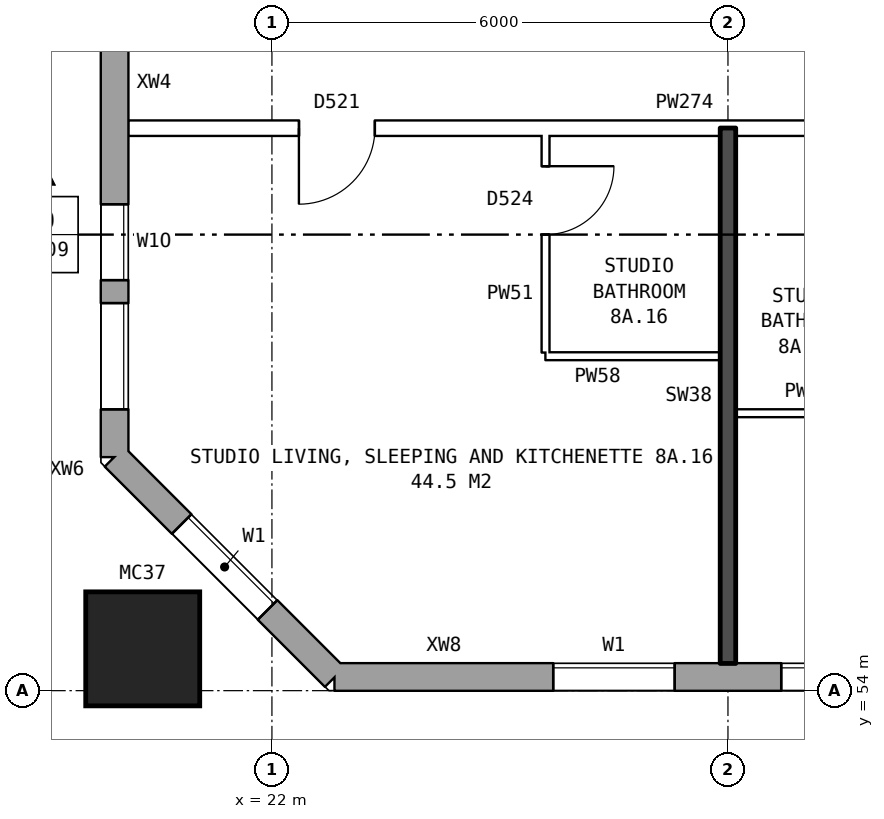
"""IFC4 building model, lengths in metres.
Left out: names, types, materials, properties, quantities, classifications, styles, units other than length and angle.
Written with IfcOpenShell. Run it as: python <this file> out.ifc"""

import sys

from ifc_helpers import new_model, si_unit, direction, frame, frame_2d, origin, origin_2d, place, context, subcontext, project, spatial, rectangle, hollow_rectangle, extrude, element, fill, save


model = new_model("IFC4")
c1 = context("Model", 3, precision=1e-05, world=origin(), true_north=direction((0.0, 1.0)))
c2 = subcontext(c1, "Body", "Model", "MODEL_VIEW")
j1 = project(units=[si_unit("LENGTHUNIT", "METRE"), si_unit("PLANEANGLEUNIT", "RADIAN")], contexts=[c1])
p1 = place(None, origin())
s1 = spatial("IfcSite", under=j1, at=p1, CompositionType="ELEMENT")
p2 = place(p1, origin())
s2 = spatial("IfcBuilding", under=s1, at=p2, CompositionType="ELEMENT")
p3 = place(p2, frame((0.0, 0.0, 31.9)))
s3 = spatial("IfcBuildingStorey", under=s2, at=p3, CompositionType="ELEMENT", Elevation=31.9)
p4 = place(p3, frame((20.3, 54.55, 0.0), z_axis=(0.0, 0.0, 1.0), x_axis=(1.0, 0.0, 0.0)))
e1 = element("IfcColumn", 1, at=p4, inside=s3, PredefinedType="COLUMN", context=c2, shape_type="SweptSolid", body=[
    extrude(hollow_rectangle(XDim=1.5, YDim=1.5, WallThickness=0.08, at=origin_2d()), origin(), (0.0, 0.0, 1.0), 3.1),
])
p5 = place(p3, frame((19.93, 57.075, 0.0), z_axis=(0.0, 0.0, 1.0), x_axis=(0.707106781187, -0.707106781187, 0.0)))
e2 = element("IfcWall", 2, at=p5, inside=s3, PredefinedType="STANDARD", context=c2, shape_type="SweptSolid", body=[
    extrude(rectangle(XDim=4.094, YDim=0.36, at=frame_2d((2.047, 0.0))), origin(), (0.0, 0.0, 1.0), 2.85),
])
p6 = place(p5, frame((1.247, 0.0, 0.8)))
e3 = element("IfcOpeningElement", 3, at=p6, cuts=e2, PredefinedType="OPENING", context=c2, shape_type="SweptSolid", body=[
    extrude(rectangle(XDim=1.6, YDim=1.8, at=frame_2d((0.8, 0.9))), frame((0.0, 0.19, 0.0), z_axis=(0.0, -1.0, 0.0), x_axis=(1.0, 0.0, 0.0)), (0.0, 0.0, 1.0), 0.38),
])
p7 = place(p3, frame((22.825, 54.18, 0.0), z_axis=(0.0, 0.0, 1.0), x_axis=(1.0, 0.0, 0.0)))
e4 = element("IfcWall", 4, at=p7, inside=s3, PredefinedType="STANDARD", context=c2, shape_type="SweptSolid", body=[
    extrude(rectangle(XDim=50.101, YDim=0.36, at=frame_2d((25.05, 0.0))), origin(), (0.0, 0.0, 1.0), 2.85),
])
p8 = place(p7, frame((2.875, 0.0, 0.8)))
e5 = element("IfcOpeningElement", 5, at=p8, cuts=e4, PredefinedType="OPENING", context=c2, shape_type="SweptSolid", body=[
    extrude(rectangle(XDim=1.6, YDim=1.8, at=frame_2d((0.8, 0.9))), frame((0.0, 0.19, 0.0), z_axis=(0.0, -1.0, 0.0), x_axis=(1.0, 0.0, 0.0)), (0.0, 0.0, 1.0), 0.38),
])
p9 = place(p7, frame((5.875, 0.0, 0.8)))
e6 = element("IfcOpeningElement", 6, at=p9, cuts=e4, PredefinedType="OPENING", context=c2, shape_type="SweptSolid", body=[
    extrude(rectangle(XDim=1.6, YDim=1.8, at=frame_2d((0.8, 0.9))), frame((0.0, 0.19, 0.0), z_axis=(0.0, -1.0, 0.0), x_axis=(1.0, 0.0, 0.0)), (0.0, 0.0, 1.0), 0.38),
])
p10 = place(p7, frame((8.875, 0.0, 0.8)))
e7 = element("IfcOpeningElement", 7, at=p10, cuts=e4, PredefinedType="OPENING", context=c2, shape_type="SweptSolid", body=[
    extrude(rectangle(XDim=1.6, YDim=1.8, at=frame_2d((0.8, 0.9))), frame((0.0, 0.19, 0.0), z_axis=(0.0, -1.0, 0.0), x_axis=(1.0, 0.0, 0.0)), (0.0, 0.0, 1.0), 0.38),
])
p11 = place(p7, frame((11.875, 0.0, 0.8)))
e8 = element("IfcOpeningElement", 8, at=p11, cuts=e4, PredefinedType="OPENING", context=c2, shape_type="SweptSolid", body=[
    extrude(rectangle(XDim=1.6, YDim=1.8, at=frame_2d((0.8, 0.9))), frame((0.0, 0.19, 0.0), z_axis=(0.0, -1.0, 0.0), x_axis=(1.0, 0.0, 0.0)), (0.0, 0.0, 1.0), 0.38),
])
p12 = place(p7, frame((14.875, 0.0, 0.8)))
e9 = element("IfcOpeningElement", 9, at=p12, cuts=e4, PredefinedType="OPENING", context=c2, shape_type="SweptSolid", body=[
    extrude(rectangle(XDim=1.6, YDim=1.8, at=frame_2d((0.8, 0.9))), frame((0.0, 0.19, 0.0), z_axis=(0.0, -1.0, 0.0), x_axis=(1.0, 0.0, 0.0)), (0.0, 0.0, 1.0), 0.38),
])
p13 = place(p7, frame((17.375, 0.0, 1.6)))
e10 = element("IfcOpeningElement", 10, at=p13, cuts=e4, PredefinedType="OPENING", context=c2, shape_type="SweptSolid", body=[
    extrude(rectangle(XDim=0.6, YDim=0.9, at=frame_2d((0.3, 0.45))), frame((0.0, 0.19, 0.0), z_axis=(0.0, -1.0, 0.0), x_axis=(1.0, 0.0, 0.0)), (0.0, 0.0, 1.0), 0.38),
])
p14 = place(p7, frame((20.875, 0.0, 0.8)))
e11 = element("IfcOpeningElement", 11, at=p14, cuts=e4, PredefinedType="OPENING", context=c2, shape_type="SweptSolid", body=[
    extrude(rectangle(XDim=1.6, YDim=1.8, at=frame_2d((0.8, 0.9))), frame((0.0, 0.19, 0.0), z_axis=(0.0, -1.0, 0.0), x_axis=(1.0, 0.0, 0.0)), (0.0, 0.0, 1.0), 0.38),
])
p15 = place(p7, frame((23.875, 0.0, 0.8)))
e12 = element("IfcOpeningElement", 12, at=p15, cuts=e4, PredefinedType="OPENING", context=c2, shape_type="SweptSolid", body=[
    extrude(rectangle(XDim=1.6, YDim=1.8, at=frame_2d((0.8, 0.9))), frame((0.0, 0.19, 0.0), z_axis=(0.0, -1.0, 0.0), x_axis=(1.0, 0.0, 0.0)), (0.0, 0.0, 1.0), 0.38),
])
p16 = place(p7, frame((26.875, 0.0, 0.8)))
e13 = element("IfcOpeningElement", 13, at=p16, cuts=e4, PredefinedType="OPENING", context=c2, shape_type="SweptSolid", body=[
    extrude(rectangle(XDim=1.6, YDim=1.8, at=frame_2d((0.8, 0.9))), frame((0.0, 0.19, 0.0), z_axis=(0.0, -1.0, 0.0), x_axis=(1.0, 0.0, 0.0)), (0.0, 0.0, 1.0), 0.38),
])
p17 = place(p7, frame((29.375, 0.0, 0.15)))
e14 = element("IfcOpeningElement", 14, at=p17, cuts=e4, PredefinedType="OPENING", context=c2, shape_type="SweptSolid", body=[
    extrude(rectangle(XDim=0.8, YDim=1.8, at=frame_2d((0.4, 0.9))), frame((0.0, 0.19, 0.0), z_axis=(0.0, -1.0, 0.0), x_axis=(1.0, 0.0, 0.0)), (0.0, 0.0, 1.0), 0.38),
])
p18 = place(p7, frame((32.425, 0.0, 1.4)))
e15 = element("IfcOpeningElement", 15, at=p18, cuts=e4, PredefinedType="OPENING", context=c2, shape_type="SweptSolid", body=[
    extrude(rectangle(XDim=0.6, YDim=1.2, at=frame_2d((0.3, 0.6))), frame((0.0, 0.19, 0.0), z_axis=(0.0, -1.0, 0.0), x_axis=(1.0, 0.0, 0.0)), (0.0, 0.0, 1.0), 0.38),
])
p19 = place(p7, frame((35.875, 0.0, 0.8)))
e16 = element("IfcOpeningElement", 16, at=p19, cuts=e4, PredefinedType="OPENING", context=c2, shape_type="SweptSolid", body=[
    extrude(rectangle(XDim=1.6, YDim=1.8, at=frame_2d((0.8, 0.9))), frame((0.0, 0.19, 0.0), z_axis=(0.0, -1.0, 0.0), x_axis=(1.0, 0.0, 0.0)), (0.0, 0.0, 1.0), 0.38),
])
p20 = place(p7, frame((38.875, 0.0, 0.8)))
e17 = element("IfcOpeningElement", 17, at=p20, cuts=e4, PredefinedType="OPENING", context=c2, shape_type="SweptSolid", body=[
    extrude(rectangle(XDim=1.6, YDim=1.8, at=frame_2d((0.8, 0.9))), frame((0.0, 0.19, 0.0), z_axis=(0.0, -1.0, 0.0), x_axis=(1.0, 0.0, 0.0)), (0.0, 0.0, 1.0), 0.38),
])
p21 = place(p7, frame((41.875, 0.0, 0.8)))
e18 = element("IfcOpeningElement", 18, at=p21, cuts=e4, PredefinedType="OPENING", context=c2, shape_type="SweptSolid", body=[
    extrude(rectangle(XDim=1.6, YDim=1.8, at=frame_2d((0.8, 0.9))), frame((0.0, 0.19, 0.0), z_axis=(0.0, -1.0, 0.0), x_axis=(1.0, 0.0, 0.0)), (0.0, 0.0, 1.0), 0.38),
])
p22 = place(p7, frame((44.875, 0.0, 0.8)))
e19 = element("IfcOpeningElement", 19, at=p22, cuts=e4, PredefinedType="OPENING", context=c2, shape_type="SweptSolid", body=[
    extrude(rectangle(XDim=1.6, YDim=1.8, at=frame_2d((0.8, 0.9))), frame((0.0, 0.19, 0.0), z_axis=(0.0, -1.0, 0.0), x_axis=(1.0, 0.0, 0.0)), (0.0, 0.0, 1.0), 0.38),
])
p23 = place(p7, frame((47.875, 0.0, 0.8)))
e20 = element("IfcOpeningElement", 20, at=p23, cuts=e4, PredefinedType="OPENING", context=c2, shape_type="SweptSolid", body=[
    extrude(rectangle(XDim=1.6, YDim=1.8, at=frame_2d((0.8, 0.9))), frame((0.0, 0.19, 0.0), z_axis=(0.0, -1.0, 0.0), x_axis=(1.0, 0.0, 0.0)), (0.0, 0.0, 1.0), 0.38),
])
p24 = place(p7, frame((19.525, 0.0, 0.8)))
e21 = element("IfcOpeningElement", 21, at=p24, cuts=e4, PredefinedType="OPENING", context=c2, shape_type="SweptSolid", body=[
    extrude(rectangle(XDim=1.0, YDim=0.9, at=frame_2d((0.5, 0.45))), frame((0.0, 0.19, 0.0), z_axis=(0.0, -1.0, 0.0), x_axis=(1.0, 0.0, 0.0)), (0.0, 0.0, 1.0), 0.38),
])
p25 = place(p7, frame((30.475, 0.0, 0.15)))
e22 = element("IfcOpeningElement", 22, at=p25, cuts=e4, PredefinedType="OPENING", context=c2, shape_type="SweptSolid", body=[
    extrude(rectangle(XDim=1.0, YDim=0.9, at=frame_2d((0.5, 0.45))), frame((0.0, 0.19, 0.0), z_axis=(0.0, -1.0, 0.0), x_axis=(1.0, 0.0, 0.0)), (0.0, 0.0, 1.0), 0.38),
])
p26 = place(p7, frame((33.325, 0.0, 0.8)))
e23 = element("IfcOpeningElement", 23, at=p26, cuts=e4, PredefinedType="OPENING", context=c2, shape_type="SweptSolid", body=[
    extrude(rectangle(XDim=1.6, YDim=1.8, at=frame_2d((0.8, 0.9))), frame((0.0, 0.19, 0.0), z_axis=(0.0, -1.0, 0.0), x_axis=(1.0, 0.0, 0.0)), (0.0, 0.0, 1.0), 0.38),
])
p27 = place(p3, frame((19.93, 82.925, 0.0), z_axis=(0.0, 0.0, 1.0), x_axis=(0.0, -1.0, 0.0)))
e24 = element("IfcWall", 24, at=p27, inside=s3, PredefinedType="STANDARD", context=c2, shape_type="SweptSolid", body=[
    extrude(rectangle(XDim=25.851, YDim=0.36, at=frame_2d((12.925, 0.0))), origin(), (0.0, 0.0, 1.0), 2.85),
])
p28 = place(p27, frame((0.3, 0.0, 0.8)))
e25 = element("IfcOpeningElement", 25, at=p28, cuts=e24, PredefinedType="OPENING", context=c2, shape_type="SweptSolid", body=[
    extrude(rectangle(XDim=1.4, YDim=1.8, at=frame_2d((0.7, 0.9))), frame((0.0, 0.19, 0.0), z_axis=(0.0, -1.0, 0.0), x_axis=(1.0, 0.0, 0.0)), (0.0, 0.0, 1.0), 0.38),
])
p29 = place(p27, frame((5.575, 0.0, 1.4)))
e26 = element("IfcOpeningElement", 26, at=p29, cuts=e24, PredefinedType="OPENING", context=c2, shape_type="SweptSolid", body=[
    extrude(rectangle(XDim=1.6, YDim=1.2, at=frame_2d((0.8, 0.6))), frame((0.0, 0.19, 0.0), z_axis=(0.0, -1.0, 0.0), x_axis=(1.0, 0.0, 0.0)), (0.0, 0.0, 1.0), 0.38),
])
p30 = place(p27, frame((7.625, 0.0, 0.8)))
e27 = element("IfcOpeningElement", 27, at=p30, cuts=e24, PredefinedType="OPENING", context=c2, shape_type="SweptSolid", body=[
    extrude(rectangle(XDim=1.6, YDim=1.8, at=frame_2d((0.8, 0.9))), frame((0.0, 0.19, 0.0), z_axis=(0.0, -1.0, 0.0), x_axis=(1.0, 0.0, 0.0)), (0.0, 0.0, 1.0), 0.38),
])
p31 = place(p27, frame((10.625, 0.0, 0.8)))
e28 = element("IfcOpeningElement", 28, at=p31, cuts=e24, PredefinedType="OPENING", context=c2, shape_type="SweptSolid", body=[
    extrude(rectangle(XDim=1.6, YDim=1.8, at=frame_2d((0.8, 0.9))), frame((0.0, 0.19, 0.0), z_axis=(0.0, -1.0, 0.0), x_axis=(1.0, 0.0, 0.0)), (0.0, 0.0, 1.0), 0.38),
])
p32 = place(p27, frame((13.625, 0.0, 0.8)))
e29 = element("IfcOpeningElement", 29, at=p32, cuts=e24, PredefinedType="OPENING", context=c2, shape_type="SweptSolid", body=[
    extrude(rectangle(XDim=1.6, YDim=1.8, at=frame_2d((0.8, 0.9))), frame((0.0, 0.19, 0.0), z_axis=(0.0, -1.0, 0.0), x_axis=(1.0, 0.0, 0.0)), (0.0, 0.0, 1.0), 0.38),
])
p33 = place(p27, frame((16.625, 0.0, 0.8)))
e30 = element("IfcOpeningElement", 30, at=p33, cuts=e24, PredefinedType="OPENING", context=c2, shape_type="SweptSolid", body=[
    extrude(rectangle(XDim=1.6, YDim=1.8, at=frame_2d((0.8, 0.9))), frame((0.0, 0.19, 0.0), z_axis=(0.0, -1.0, 0.0), x_axis=(1.0, 0.0, 0.0)), (0.0, 0.0, 1.0), 0.38),
])
p34 = place(p27, frame((9.525, 0.0, 0.8)))
e31 = element("IfcOpeningElement", 31, at=p34, cuts=e24, PredefinedType="OPENING", context=c2, shape_type="SweptSolid", body=[
    extrude(rectangle(XDim=0.8, YDim=1.8, at=frame_2d((0.4, 0.9))), frame((0.0, 0.19, 0.0), z_axis=(0.0, -1.0, 0.0), x_axis=(1.0, 0.0, 0.0)), (0.0, 0.0, 1.0), 0.38),
])
p35 = place(p27, frame((22.525, 0.0, 0.8)))
e32 = element("IfcOpeningElement", 32, at=p35, cuts=e24, PredefinedType="OPENING", context=c2, shape_type="SweptSolid", body=[
    extrude(rectangle(XDim=1.0, YDim=1.2, at=frame_2d((0.5, 0.6))), frame((0.0, 0.19, 0.0), z_axis=(0.0, -1.0, 0.0), x_axis=(1.0, 0.0, 0.0)), (0.0, 0.0, 1.0), 0.38),
])
p36 = place(p27, frame((2.0, 0.0, 0.8)))
e33 = element("IfcOpeningElement", 33, at=p36, cuts=e24, PredefinedType="OPENING", context=c2, shape_type="SweptSolid", body=[
    extrude(rectangle(XDim=0.8, YDim=1.5, at=frame_2d((0.4, 0.75))), frame((0.0, 0.19, 0.0), z_axis=(0.0, -1.0, 0.0), x_axis=(1.0, 0.0, 0.0)), (0.0, 0.0, 1.0), 0.38),
])
p37 = place(p27, frame((12.525, 0.0, 0.8)))
e34 = element("IfcOpeningElement", 34, at=p37, cuts=e24, PredefinedType="OPENING", context=c2, shape_type="SweptSolid", body=[
    extrude(rectangle(XDim=0.8, YDim=1.8, at=frame_2d((0.4, 0.9))), frame((0.0, 0.19, 0.0), z_axis=(0.0, -1.0, 0.0), x_axis=(1.0, 0.0, 0.0)), (0.0, 0.0, 1.0), 0.38),
])
p38 = place(p27, frame((15.525, 0.0, 0.8)))
e35 = element("IfcOpeningElement", 35, at=p38, cuts=e24, PredefinedType="OPENING", context=c2, shape_type="SweptSolid", body=[
    extrude(rectangle(XDim=0.8, YDim=1.8, at=frame_2d((0.4, 0.9))), frame((0.0, 0.19, 0.0), z_axis=(0.0, -1.0, 0.0), x_axis=(1.0, 0.0, 0.0)), (0.0, 0.0, 1.0), 0.38),
])
p39 = place(p27, frame((18.525, 0.0, 0.9)))
e36 = element("IfcOpeningElement", 36, at=p39, cuts=e24, PredefinedType="OPENING", context=c2, shape_type="SweptSolid", body=[
    extrude(rectangle(XDim=0.8, YDim=1.5, at=frame_2d((0.4, 0.75))), frame((0.0, 0.19, 0.0), z_axis=(0.0, -1.0, 0.0), x_axis=(1.0, 0.0, 0.0)), (0.0, 0.0, 1.0), 0.38),
])
p40 = place(p27, frame((23.825, 0.0, 0.8)))
e37 = element("IfcOpeningElement", 37, at=p40, cuts=e24, PredefinedType="OPENING", context=c2, shape_type="SweptSolid", body=[
    extrude(rectangle(XDim=1.4, YDim=1.8, at=frame_2d((0.7, 0.9))), frame((0.0, 0.19, 0.0), z_axis=(0.0, -1.0, 0.0), x_axis=(1.0, 0.0, 0.0)), (0.0, 0.0, 1.0), 0.38),
])
p41 = place(p3, frame((28.1, 57.65, 0.0), z_axis=(0.0, 0.0, 1.0), x_axis=(1.0, 0.0, 0.0)))
e38 = element("IfcWall", 38, at=p41, inside=s3, PredefinedType="PARTITIONING", context=c2, shape_type="SweptSolid", body=[
    extrude(rectangle(XDim=1.9, YDim=0.1, at=frame_2d((0.95, 0.0))), origin(), (0.0, 0.0, 1.0), 2.85),
])
p42 = place(p3, frame((25.6, 58.4, 0.0), z_axis=(0.0, 0.0, 1.0), x_axis=(1.0, 0.0, 0.0)))
e39 = element("IfcWall", 39, at=p42, inside=s3, PredefinedType="PARTITIONING", context=c2, shape_type="SweptSolid", body=[
    extrude(rectangle(XDim=2.3, YDim=0.1, at=frame_2d((1.15, 0.0))), origin(), (0.0, 0.0, 1.0), 2.85),
])
p43 = place(p3, frame((20.11, 61.4, 0.0), z_axis=(0.0, 0.0, 1.0), x_axis=(1.0, 0.0, 0.0)))
e40 = element("IfcWall", 40, at=p43, inside=s3, PredefinedType="PARTITIONING", context=c2, shape_type="SweptSolid", body=[
    extrude(rectangle(XDim=25.79, YDim=0.2, at=frame_2d((12.895, 0.0))), origin(), (0.0, 0.0, 1.0), 2.85),
])
p44 = place(p43, frame((23.34, 0.0, 0.0)))
e41 = element("IfcOpeningElement", 41, at=p44, cuts=e40, PredefinedType="OPENING", context=c2, shape_type="SweptSolid", body=[
    extrude(rectangle(XDim=1.0, YDim=2.1, at=frame_2d((0.5, 1.05))), frame((0.0, 0.11, 0.0), z_axis=(0.0, -1.0, 0.0), x_axis=(1.0, 0.0, 0.0)), (0.0, 0.0, 1.0), 0.22),
])
p45 = place(p43, frame((17.39, 0.0, 0.0)))
e42 = element("IfcOpeningElement", 42, at=p45, cuts=e40, PredefinedType="OPENING", context=c2, shape_type="SweptSolid", body=[
    extrude(rectangle(XDim=1.0, YDim=2.1, at=frame_2d((0.5, 1.05))), frame((0.0, 0.11, 0.0), z_axis=(0.0, -1.0, 0.0), x_axis=(1.0, 0.0, 0.0)), (0.0, 0.0, 1.0), 0.22),
])
p46 = place(p43, frame((11.39, 0.0, 0.0)))
e43 = element("IfcOpeningElement", 43, at=p46, cuts=e40, PredefinedType="OPENING", context=c2, shape_type="SweptSolid", body=[
    extrude(rectangle(XDim=1.0, YDim=2.1, at=frame_2d((0.5, 1.05))), frame((0.0, 0.11, 0.0), z_axis=(0.0, -1.0, 0.0), x_axis=(1.0, 0.0, 0.0)), (0.0, 0.0, 1.0), 0.22),
])
p47 = place(p43, frame((2.245, 0.0, 0.0)))
e44 = element("IfcOpeningElement", 44, at=p47, cuts=e40, PredefinedType="OPENING", context=c2, shape_type="SweptSolid", body=[
    extrude(rectangle(XDim=1.0, YDim=2.1, at=frame_2d((0.5, 1.05))), frame((0.0, 0.11, 0.0), z_axis=(0.0, -1.0, 0.0), x_axis=(1.0, 0.0, 0.0)), (0.0, 0.0, 1.0), 0.22),
])
p48 = place(p3, frame((25.6, 58.45, 0.0), z_axis=(0.0, 0.0, 1.0), x_axis=(0.0, 1.0, 0.0)))
e45 = element("IfcWall", 45, at=p48, inside=s3, PredefinedType="PARTITIONING", context=c2, shape_type="SweptSolid", body=[
    extrude(rectangle(XDim=2.85, YDim=0.1, at=frame_2d((1.425, 0.0))), origin(), (0.0, 0.0, 1.0), 2.85),
])
p49 = place(p48, frame((1.55, 0.0, 0.0)))
e46 = element("IfcOpeningElement", 46, at=p49, cuts=e45, PredefinedType="OPENING", context=c2, shape_type="SweptSolid", body=[
    extrude(rectangle(XDim=0.9, YDim=2.1, at=frame_2d((0.45, 1.05))), frame((0.0, 0.06, 0.0), z_axis=(0.0, -1.0, 0.0), x_axis=(1.0, 0.0, 0.0)), (0.0, 0.0, 1.0), 0.12),
])
p50 = place(p3, frame((28.0, 54.36, 0.0), z_axis=(0.0, 0.0, 1.0), x_axis=(0.0, 1.0, 0.0)))
e47 = element("IfcWall", 47, at=p50, inside=s3, PredefinedType="SOLIDWALL", context=c2, shape_type="SweptSolid", body=[
    extrude(rectangle(XDim=7.04, YDim=0.2, at=frame_2d((3.52, 0.0))), origin(), (0.0, 0.0, 1.0), 2.85),
])
p51 = place(p6, origin())
e48 = element("IfcWindow", 48, at=p51, inside=s3, PartitioningType="SINGLE_PANEL", PredefinedType="WINDOW", context=c2, shape_type="SweptSolid", body=[
    extrude(rectangle(XDim=1.6, YDim=1.8, at=frame_2d((0.8, 0.9))), frame((0.0, 0.15, 0.0), z_axis=(0.0, -1.0, 0.0), x_axis=(1.0, 0.0, 0.0)), (0.0, 0.0, 1.0), 0.06),
])
fill(e3, e48)
p52 = place(p8, origin())
e49 = element("IfcWindow", 49, at=p52, inside=s3, PartitioningType="SINGLE_PANEL", PredefinedType="WINDOW", context=c2, shape_type="SweptSolid", body=[
    extrude(rectangle(XDim=1.6, YDim=1.8, at=frame_2d((0.8, 0.9))), frame((0.0, 0.15, 0.0), z_axis=(0.0, -1.0, 0.0), x_axis=(1.0, 0.0, 0.0)), (0.0, 0.0, 1.0), 0.06),
])
fill(e5, e49)
p53 = place(p9, origin())
e50 = element("IfcWindow", 50, at=p53, inside=s3, PartitioningType="SINGLE_PANEL", PredefinedType="WINDOW", context=c2, shape_type="SweptSolid", body=[
    extrude(rectangle(XDim=1.6, YDim=1.8, at=frame_2d((0.8, 0.9))), frame((0.0, 0.15, 0.0), z_axis=(0.0, -1.0, 0.0), x_axis=(1.0, 0.0, 0.0)), (0.0, 0.0, 1.0), 0.06),
])
fill(e6, e50)
p54 = place(p35, origin())
e51 = element("IfcWindow", 51, at=p54, inside=s3, PartitioningType="SINGLE_PANEL", PredefinedType="WINDOW", context=c2, shape_type="SweptSolid", body=[
    extrude(rectangle(XDim=1.0, YDim=1.2, at=frame_2d((0.5, 0.6))), frame((0.0, 0.15, 0.0), z_axis=(0.0, -1.0, 0.0), x_axis=(1.0, 0.0, 0.0)), (0.0, 0.0, 1.0), 0.06),
])
fill(e32, e51)
p55 = place(p47, frame((1.0, 0.0, 0.0), z_axis=(0.0, 0.0, 1.0), x_axis=(-1.0, 0.0, 0.0)))
e52 = element("IfcDoor", 52, at=p55, inside=s3, OperationType="SINGLE_SWING_RIGHT", PredefinedType="DOOR", context=c2, shape_type="SweptSolid", body=[
    extrude(rectangle(XDim=1.0, YDim=2.1, at=frame_2d((0.5, 1.05))), frame((0.0, 0.025, 0.0), z_axis=(0.0, -1.0, 0.0), x_axis=(1.0, 0.0, 0.0)), (0.0, 0.0, 1.0), 0.05),
])
fill(e44, e52)
p56 = place(p49, frame((0.9, 0.0, 0.0), z_axis=(0.0, 0.0, 1.0), x_axis=(-1.0, 0.0, 0.0)))
e53 = element("IfcDoor", 53, at=p56, inside=s3, OperationType="SINGLE_SWING_LEFT", PredefinedType="DOOR", context=c2, shape_type="SweptSolid", body=[
    extrude(rectangle(XDim=0.9, YDim=2.1, at=frame_2d((0.45, 1.05))), frame((0.0, 0.025, 0.0), z_axis=(0.0, -1.0, 0.0), x_axis=(1.0, 0.0, 0.0)), (0.0, 0.0, 1.0), 0.05),
])
fill(e46, e53)
p57 = place(p40, origin())
e54 = element("IfcWindow", 54, at=p57, inside=s3, PartitioningType="SINGLE_PANEL", PredefinedType="WINDOW", context=c2, shape_type="SweptSolid", body=[
    extrude(rectangle(XDim=1.4, YDim=1.8, at=frame_2d((0.7, 0.9))), frame((0.0, 0.15, 0.0), z_axis=(0.0, -1.0, 0.0), x_axis=(1.0, 0.0, 0.0)), (0.0, 0.0, 1.0), 0.06),
])
fill(e37, e54)
save(model, sys.argv[1])
